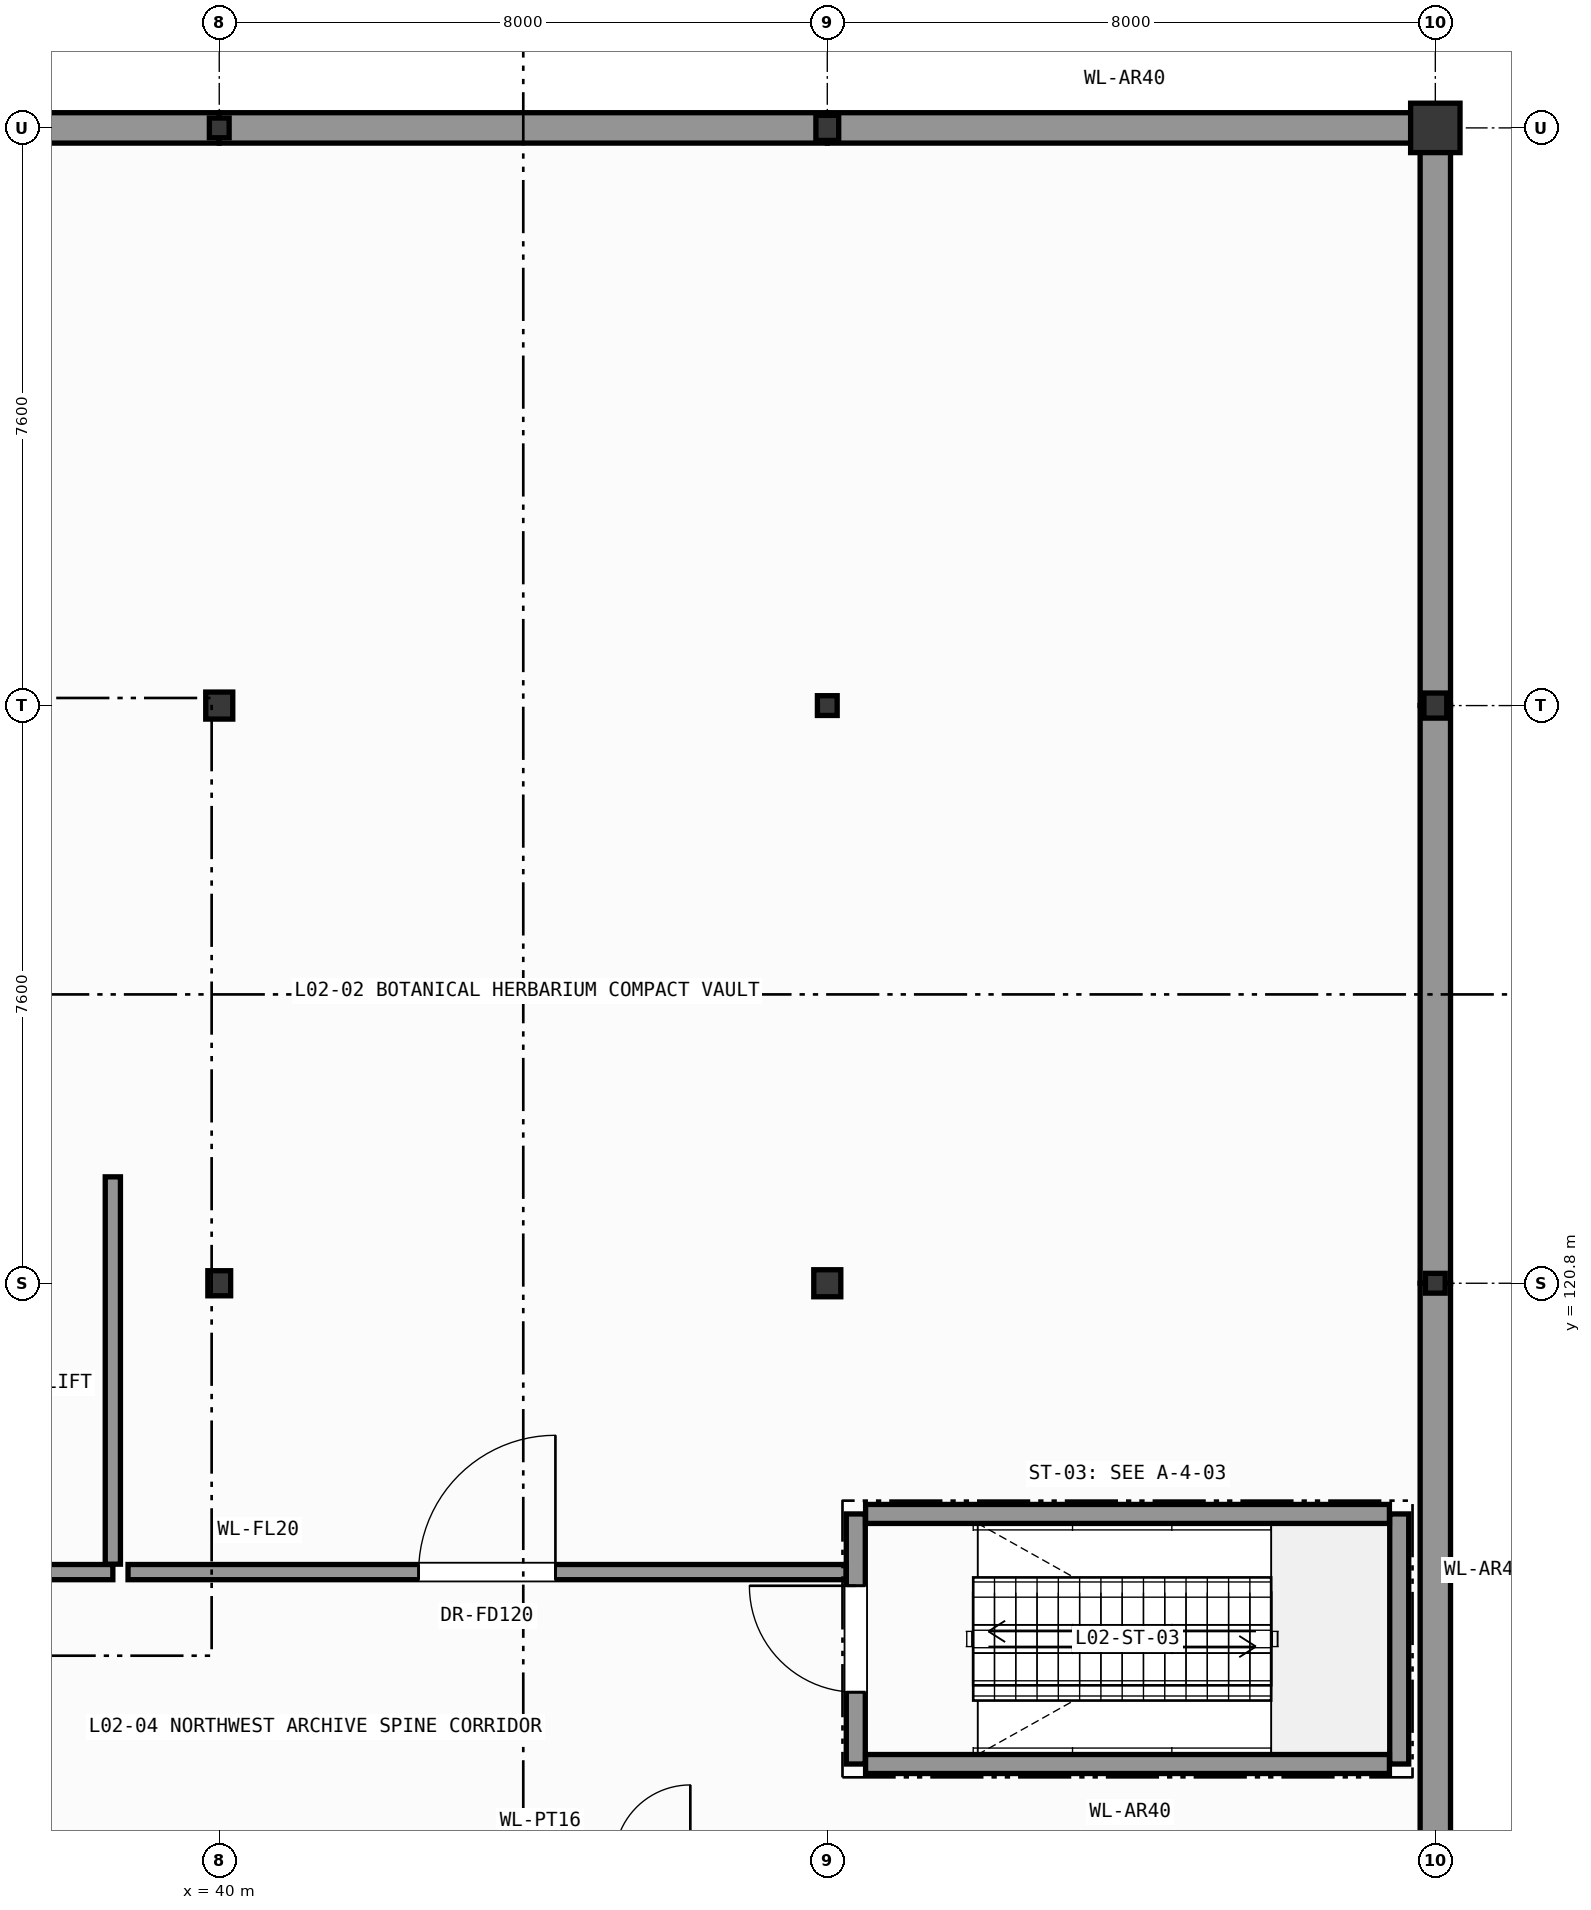
"""IFC4 building model, lengths in metres.
Left out: names, types, materials, properties, quantities, classifications, styles, units other than length and angle.
Written with IfcOpenShell. Run it as: python <this file> out.ifc"""

import sys

from ifc_helpers import new_model, si_unit, direction, frame, frame_2d, origin, origin_2d, place, context, subcontext, project, spatial, rectangle, hollow_rectangle, hollow_circle, i_section, extrude, element, fill, save


model = new_model("IFC4")
c1 = context("Model", 3, precision=1e-05, world=origin(), true_north=direction((0.0, 1.0)))
c2 = subcontext(c1, "Body", "Model", "MODEL_VIEW")
j1 = project(units=[si_unit("LENGTHUNIT", "METRE"), si_unit("PLANEANGLEUNIT", "RADIAN")], contexts=[c1])
p1 = place(None, origin())
s1 = spatial("IfcSite", under=j1, at=p1, CompositionType="ELEMENT")
p2 = place(p1, origin())
s2 = spatial("IfcBuilding", under=s1, at=p2, CompositionType="ELEMENT")
p3 = place(p2, frame((0.0, 0.0, 7.8)))
s3 = spatial("IfcBuildingStorey", under=s2, at=p3, CompositionType="ELEMENT", Elevation=7.8)
p4 = place(p3, frame((40.0, 120.8, 0.0), z_axis=(0.0, 0.0, 1.0), x_axis=(1.0, 0.0, 0.0)))
e1 = element("IfcColumn", 1, at=p4, inside=s3, PredefinedType="COLUMN", context=c2, shape_type="SweptSolid", body=[
    extrude(i_section(OverallWidth=0.3, OverallDepth=0.33, WebThickness=0.01, FlangeThickness=0.017, FilletRadius=0.027, at=origin_2d()), origin(), (0.0, 0.0, 1.0), 5.4),
])
p5 = place(p3, frame((40.0, 128.4, 0.0), z_axis=(0.0, 0.0, 1.0), x_axis=(1.0, 0.0, 0.0)))
e2 = element("IfcColumn", 2, at=p5, inside=s3, PredefinedType="COLUMN", context=c2, shape_type="SweptSolid", body=[
    extrude(hollow_circle(Radius=0.178, WallThickness=0.016, at=origin_2d()), origin(), (0.0, 0.0, 1.0), 5.4),
])
p6 = place(p3, frame((40.0, 136.0, 0.0), z_axis=(0.0, 0.0, 1.0), x_axis=(1.0, 0.0, 0.0)))
e3 = element("IfcColumn", 3, at=p6, inside=s3, PredefinedType="COLUMN", context=c2, shape_type="SweptSolid", body=[
    extrude(hollow_rectangle(XDim=0.26, YDim=0.26, WallThickness=0.012, InnerFilletRadius=0.012, OuterFilletRadius=0.025, at=origin_2d()), origin(), (0.0, 0.0, 1.0), 5.4),
])
p7 = place(p3, frame((48.0, 120.8, 0.0), z_axis=(0.0, 0.0, 1.0), x_axis=(1.0, 0.0, 0.0)))
e4 = element("IfcColumn", 4, at=p7, inside=s3, PredefinedType="COLUMN", context=c2, shape_type="SweptSolid", body=[
    extrude(hollow_circle(Radius=0.178, WallThickness=0.016, at=origin_2d()), origin(), (0.0, 0.0, 1.0), 5.4),
])
p8 = place(p3, frame((48.0, 128.4, 0.0), z_axis=(0.0, 0.0, 1.0), x_axis=(1.0, 0.0, 0.0)))
e5 = element("IfcColumn", 5, at=p8, inside=s3, PredefinedType="COLUMN", context=c2, shape_type="SweptSolid", body=[
    extrude(hollow_rectangle(XDim=0.26, YDim=0.26, WallThickness=0.012, InnerFilletRadius=0.012, OuterFilletRadius=0.025, at=origin_2d()), origin(), (0.0, 0.0, 1.0), 5.4),
])
p9 = place(p3, frame((48.0, 136.0, 0.0), z_axis=(0.0, 0.0, 1.0), x_axis=(1.0, 0.0, 0.0)))
e6 = element("IfcColumn", 6, at=p9, inside=s3, PredefinedType="COLUMN", context=c2, shape_type="SweptSolid", body=[
    extrude(i_section(OverallWidth=0.3, OverallDepth=0.33, WebThickness=0.01, FlangeThickness=0.017, FilletRadius=0.027, at=origin_2d()), origin(), (0.0, 0.0, 1.0), 5.4),
])
p10 = place(p3, frame((56.0, 120.8, 0.0), z_axis=(0.0, 0.0, 1.0), x_axis=(1.0, 0.0, 0.0)))
e7 = element("IfcColumn", 7, at=p10, inside=s3, PredefinedType="COLUMN", context=c2, shape_type="SweptSolid", body=[
    extrude(hollow_rectangle(XDim=0.26, YDim=0.26, WallThickness=0.012, InnerFilletRadius=0.012, OuterFilletRadius=0.025, at=origin_2d()), origin(), (0.0, 0.0, 1.0), 5.4),
])
p11 = place(p3, frame((56.0, 128.4, 0.0), z_axis=(0.0, 0.0, 1.0), x_axis=(1.0, 0.0, 0.0)))
e8 = element("IfcColumn", 8, at=p11, inside=s3, PredefinedType="COLUMN", context=c2, shape_type="SweptSolid", body=[
    extrude(i_section(OverallWidth=0.3, OverallDepth=0.33, WebThickness=0.01, FlangeThickness=0.017, FilletRadius=0.027, at=origin_2d()), origin(), (0.0, 0.0, 1.0), 5.4),
])
p12 = place(p3, frame((56.0, 136.0, 0.0), z_axis=(0.0, 0.0, 1.0), x_axis=(1.0, 0.0, 0.0)))
e9 = element("IfcColumn", 9, at=p12, inside=s3, PredefinedType="PILASTER", context=c2, shape_type="SweptSolid", body=[
    extrude(rectangle(XDim=0.65, YDim=0.65, at=origin_2d()), origin(), (0.0, 0.0, 1.0), 5.4),
])
p13 = place(p3, frame((56.0, 120.8, 0.0), z_axis=(0.0, 0.0, 1.0), x_axis=(0.0, -1.0, 0.0)))
e10 = element("IfcWall", 10, at=p13, inside=s3, PredefinedType="SOLIDWALL", context=c2, shape_type="SweptSolid", body=[
    extrude(rectangle(XDim=7.396, YDim=0.4, at=frame_2d((3.698, 0.0))), origin(), (0.0, 0.0, 1.0), 5.15),
])
p14 = place(p3, frame((56.0, 128.4, 0.0), z_axis=(0.0, 0.0, 1.0), x_axis=(0.0, -1.0, 0.0)))
e11 = element("IfcWall", 11, at=p14, inside=s3, PredefinedType="SOLIDWALL", context=c2, shape_type="SweptSolid", body=[
    extrude(rectangle(XDim=7.6, YDim=0.4, at=frame_2d((3.8, 0.0))), origin(), (0.0, 0.0, 1.0), 5.15),
])
p15 = place(p3, frame((56.0, 136.0, 0.0), z_axis=(0.0, 0.0, 1.0), x_axis=(0.0, -1.0, 0.0)))
e12 = element("IfcWall", 12, at=p15, inside=s3, PredefinedType="SOLIDWALL", context=c2, shape_type="SweptSolid", body=[
    extrude(rectangle(XDim=7.6, YDim=0.4, at=frame_2d((3.8, 0.0))), origin(), (0.0, 0.0, 1.0), 5.15),
])
p16 = place(p3, frame((48.0, 136.0, 0.0), z_axis=(0.0, 0.0, 1.0), x_axis=(1.0, 0.0, 0.0)))
e13 = element("IfcWall", 13, at=p16, inside=s3, PredefinedType="SOLIDWALL", context=c2, shape_type="SweptSolid", body=[
    extrude(rectangle(XDim=7.796, YDim=0.4, at=frame_2d((3.898, 0.0))), origin(), (0.0, 0.0, 1.0), 5.15),
])
for number, where, z_axis, x_axis in (
    (14, (40.0, 136.0, 0.0), (0.0, 0.0, 1.0), (1.0, 0.0, 0.0)),
    (15, (32.0, 136.0, 0.0), (0.0, 0.0, 1.0), (1.0, 0.0, 0.0)),
):
    element("IfcWall", number, at=place(p3, frame(where, z_axis=z_axis, x_axis=x_axis)), inside=s3, PredefinedType="SOLIDWALL", context=c2, shape_type="SweptSolid", body=[
        extrude(rectangle(XDim=8.0, YDim=0.4, at=frame_2d((4.0, 0.0))), origin(), (0.0, 0.0, 1.0), 5.15),
    ])
p17 = place(p3, frame((48.375, 114.475, 0.0), z_axis=(0.0, 0.0, 1.0), x_axis=(0.0, 1.0, 0.0)))
e16 = element("IfcWall", 16, at=p17, inside=s3, PredefinedType="SHEAR", context=c2, shape_type="SweptSolid", body=[
    extrude(rectangle(XDim=3.29, YDim=0.25, at=frame_2d((1.645, 0.0))), origin(), (0.0, 0.0, 1.0), 5.15),
])
p18 = place(p17, frame((0.945, 0.0, 0.0)))
e17 = element("IfcOpeningElement", 17, at=p18, cuts=e16, PredefinedType="OPENING", context=c2, shape_type="SweptSolid", body=[
    extrude(rectangle(XDim=1.4, YDim=2.2, at=frame_2d((0.7, 1.1))), frame((0.0, 0.135, 0.0), z_axis=(0.0, -1.0, 0.0), x_axis=(1.0, 0.0, 0.0)), (0.0, 0.0, 1.0), 0.27),
])
p19 = place(p3, frame((55.525, 114.475, 0.0), z_axis=(0.0, 0.0, 1.0), x_axis=(0.0, 1.0, 0.0)))
e18 = element("IfcWall", 18, at=p19, inside=s3, PredefinedType="SHEAR", context=c2, shape_type="SweptSolid", body=[
    extrude(rectangle(XDim=3.29, YDim=0.25, at=frame_2d((1.645, 0.0))), origin(), (0.0, 0.0, 1.0), 5.15),
])
for number, where, z_axis, x_axis in (
    (19, (48.504, 114.475, 0.0), (0.0, 0.0, 1.0), (1.0, 0.0, 0.0)),
    (20, (48.504, 117.765, 0.0), (0.0, 0.0, 1.0), (1.0, 0.0, 0.0)),
):
    element("IfcWall", number, at=place(p3, frame(where, z_axis=z_axis, x_axis=x_axis)), inside=s3, PredefinedType="SHEAR", context=c2, shape_type="SweptSolid", body=[
        extrude(rectangle(XDim=6.892, YDim=0.25, at=frame_2d((3.446, 0.0))), origin(), (0.0, 0.0, 1.0), 5.15),
    ])
p20 = place(p3, frame((33.0, 117.0, 0.0), z_axis=(0.0, 0.0, 1.0), x_axis=(1.0, 0.0, 0.0)))
e21 = element("IfcWall", 21, at=p20, inside=s3, PredefinedType="PARTITIONING", context=c2, shape_type="SweptSolid", body=[
    extrude(rectangle(XDim=5.6, YDim=0.2, at=frame_2d((2.8, 0.0))), origin(), (0.0, 0.0, 1.0), 5.15),
])
p21 = place(p20, frame((2.05, 0.0, 0.0)))
e22 = element("IfcOpeningElement", 22, at=p21, cuts=e21, PredefinedType="OPENING", context=c2, shape_type="SweptSolid", body=[
    extrude(rectangle(XDim=1.5, YDim=2.2, at=frame_2d((0.75, 1.1))), frame((0.0, 0.11, 0.0), z_axis=(0.0, -1.0, 0.0), x_axis=(1.0, 0.0, 0.0)), (0.0, 0.0, 1.0), 0.22),
])
p22 = place(p3, frame((38.6, 117.104, 0.0), z_axis=(0.0, 0.0, 1.0), x_axis=(0.0, 1.0, 0.0)))
e23 = element("IfcWall", 23, at=p22, inside=s3, PredefinedType="PARTITIONING", context=c2, shape_type="SweptSolid", body=[
    extrude(rectangle(XDim=5.096, YDim=0.2, at=frame_2d((2.548, 0.0))), origin(), (0.0, 0.0, 1.0), 5.15),
])
p23 = place(p3, frame((38.8, 117.0, 0.0), z_axis=(0.0, 0.0, 1.0), x_axis=(1.0, 0.0, 0.0)))
e24 = element("IfcWall", 24, at=p23, inside=s3, PredefinedType="PARTITIONING", context=c2, shape_type="SweptSolid", body=[
    extrude(rectangle(XDim=9.446, YDim=0.2, at=frame_2d((4.723, 0.0))), origin(), (0.0, 0.0, 1.0), 5.15),
])
p24 = place(p23, frame((3.823, 0.0, 0.0)))
e25 = element("IfcOpeningElement", 25, at=p24, cuts=e24, PredefinedType="OPENING", context=c2, shape_type="SweptSolid", body=[
    extrude(rectangle(XDim=1.8, YDim=2.4, at=frame_2d((0.9, 1.2))), frame((0.0, 0.11, 0.0), z_axis=(0.0, -1.0, 0.0), x_axis=(1.0, 0.0, 0.0)), (0.0, 0.0, 1.0), 0.22),
])
p25 = place(p18, origin())
e26 = element("IfcDoor", 26, at=p25, inside=s3, OperationType="SINGLE_SWING_RIGHT", PredefinedType="DOOR", context=c2, shape_type="SweptSolid", body=[
    extrude(rectangle(XDim=1.4, YDim=2.2, at=frame_2d((0.7, 1.1))), frame((0.0, 0.025, 0.0), z_axis=(0.0, -1.0, 0.0), x_axis=(1.0, 0.0, 0.0)), (0.0, 0.0, 1.0), 0.05),
])
fill(e17, e26)
p26 = place(p24, origin())
e27 = element("IfcDoor", 27, at=p26, inside=s3, OperationType="SINGLE_SWING_RIGHT", PredefinedType="DOOR", context=c2, shape_type="SweptSolid", body=[
    extrude(rectangle(XDim=1.8, YDim=2.4, at=frame_2d((0.9, 1.2))), frame((0.0, 0.025, 0.0), z_axis=(0.0, -1.0, 0.0), x_axis=(1.0, 0.0, 0.0)), (0.0, 0.0, 1.0), 0.05),
])
fill(e25, e27)
save(model, sys.argv[1])
